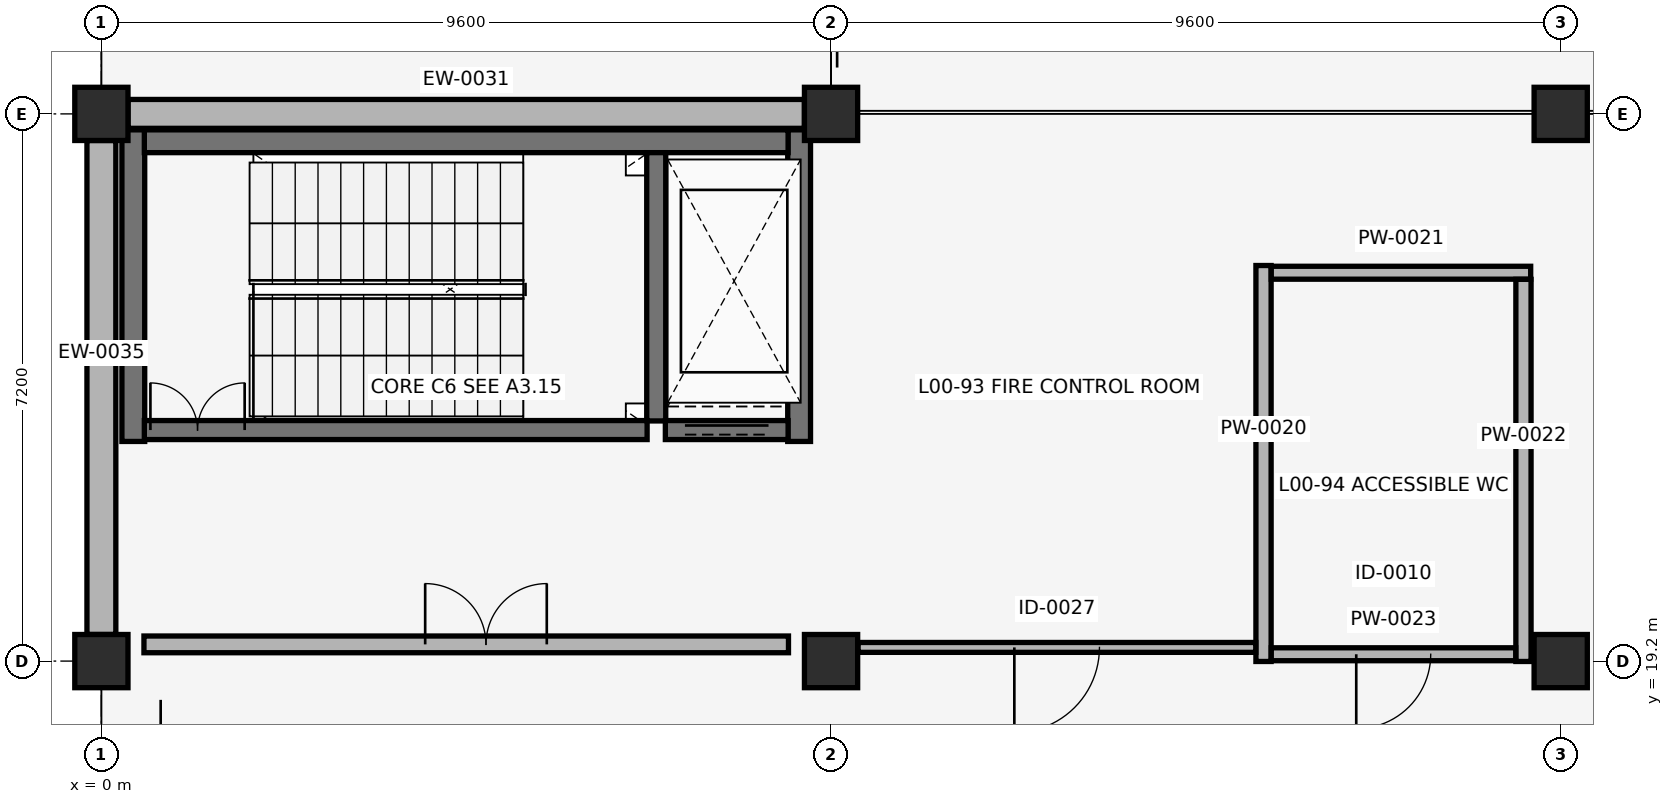
"""IFC4 building model, lengths in metres.
Left out: names, types, materials, properties, quantities, classifications, styles, units other than length and angle.
Written with IfcOpenShell. Run it as: python <this file> out.ifc"""

import sys

from ifc_helpers import new_model, si_unit, direction, frame, frame_2d, origin, origin_2d, place, context, subcontext, project, spatial, rectangle, circle, extrude, element, fill, save


model = new_model("IFC4")
c1 = context("Model", 3, precision=1e-05, world=origin(), true_north=direction((0.0, 1.0)))
c2 = subcontext(c1, "Body", "Model", "MODEL_VIEW")
j1 = project(units=[si_unit("LENGTHUNIT", "METRE"), si_unit("PLANEANGLEUNIT", "RADIAN")], contexts=[c1])
p1 = place(None, origin())
s1 = spatial("IfcSite", under=j1, at=p1, CompositionType="ELEMENT")
p2 = place(p1, origin())
s2 = spatial("IfcBuilding", under=s1, at=p2, CompositionType="ELEMENT")
p3 = place(p2, origin())
s3 = spatial("IfcBuildingStorey", under=s2, at=p3, CompositionType="ELEMENT", Elevation=0.0)
for number, where, z_axis, x_axis in (
    (1, (0.0, 19.2, 0.0), (0.0, 0.0, 1.0), (1.0, 0.0, 0.0)),
    (2, (0.0, 26.4, 0.0), (0.0, 0.0, 1.0), (1.0, 0.0, 0.0)),
    (3, (9.6, 19.2, 0.0), (0.0, 0.0, 1.0), (1.0, 0.0, 0.0)),
    (4, (9.6, 26.4, 0.0), (0.0, 0.0, 1.0), (1.0, 0.0, 0.0)),
    (5, (19.2, 19.2, 0.0), (0.0, 0.0, 1.0), (1.0, 0.0, 0.0)),
    (6, (19.2, 26.4, 0.0), (0.0, 0.0, 1.0), (1.0, 0.0, 0.0)),
):
    element("IfcColumn", number, at=place(p3, frame(where, z_axis=z_axis, x_axis=x_axis)), inside=s3, PredefinedType="COLUMN", context=c2, shape_type="SweptSolid", body=[
        extrude(circle(Radius=0.35, at=origin_2d()), origin(), (0.0, 0.0, 1.0), 4.42),
    ])
p4 = place(p3, frame((9.25, 26.4, 0.0), z_axis=(0.0, 0.0, 1.0), x_axis=(-1.0, 0.0, 0.0)))
e7 = element("IfcWall", 7, at=p4, inside=s3, PredefinedType="SOLIDWALL", context=c2, shape_type="SweptSolid", body=[
    extrude(rectangle(XDim=8.9, YDim=0.38, at=frame_2d((4.45, 0.0))), origin(), (0.0, 0.0, 1.0), 3.31),
])
p5 = place(p3, frame((0.0, 26.05, 0.0), z_axis=(0.0, 0.0, 1.0), x_axis=(0.0, -1.0, 0.0)))
e8 = element("IfcWall", 8, at=p5, inside=s3, PredefinedType="SOLIDWALL", context=c2, shape_type="SweptSolid", body=[
    extrude(rectangle(XDim=6.5, YDim=0.38, at=frame_2d((3.25, 0.0))), origin(), (0.0, 0.0, 1.0), 3.31),
])
for number, where, z_axis, x_axis in (
    (9, (0.42, 22.09, 0.0), (0.0, 0.0, 1.0), (0.0, 1.0, 0.0)),
    (10, (9.18, 22.09, 0.0), (0.0, 0.0, 1.0), (0.0, 1.0, 0.0)),
):
    element("IfcWall", number, at=place(p3, frame(where, z_axis=z_axis, x_axis=x_axis)), inside=s3, PredefinedType="SHEAR", context=c2, shape_type="SweptSolid", body=[
        extrude(rectangle(XDim=4.1, YDim=0.3, at=frame_2d((2.05, 0.0))), origin(), (0.0, 0.0, 1.0), 4.08),
    ])
p6 = place(p3, frame((0.565, 26.04, 0.0), z_axis=(0.0, 0.0, 1.0), x_axis=(1.0, 0.0, 0.0)))
e11 = element("IfcWall", 11, at=p6, inside=s3, PredefinedType="SHEAR", context=c2, shape_type="SweptSolid", body=[
    extrude(rectangle(XDim=8.47, YDim=0.3, at=frame_2d((4.235, 0.0))), origin(), (0.0, 0.0, 1.0), 4.08),
])
p7 = place(p3, frame((7.3, 22.36, 0.0), z_axis=(0.0, 0.0, 1.0), x_axis=(0.0, 1.0, 0.0)))
e12 = element("IfcWall", 12, at=p7, inside=s3, PredefinedType="SHEAR", context=c2, shape_type="SweptSolid", body=[
    extrude(rectangle(XDim=3.53, YDim=0.25, at=frame_2d((1.765, 0.0))), origin(), (0.0, 0.0, 1.0), 4.08),
])
p8 = place(p3, frame((0.565, 22.24, 0.0), z_axis=(0.0, 0.0, 1.0), x_axis=(1.0, 0.0, 0.0)))
e13 = element("IfcWall", 13, at=p8, inside=s3, PredefinedType="SHEAR", context=c2, shape_type="SweptSolid", body=[
    extrude(rectangle(XDim=6.615, YDim=0.25, at=frame_2d((3.308, 0.0))), origin(), (0.0, 0.0, 1.0), 4.08),
])
p9 = place(p8, frame((0.08, 0.0, 0.0)))
e14 = element("IfcOpeningElement", 14, at=p9, cuts=e13, PredefinedType="OPENING", context=c2, shape_type="SweptSolid", body=[
    extrude(rectangle(XDim=1.24, YDim=2.15, at=frame_2d((0.62, 1.075))), frame((0.0, 0.135, 0.0), z_axis=(0.0, -1.0, 0.0), x_axis=(1.0, 0.0, 0.0)), (0.0, 0.0, 1.0), 0.27),
])
p10 = place(p3, frame((0.56, 19.42, 0.0), z_axis=(0.0, 0.0, 1.0), x_axis=(1.0, 0.0, 0.0)))
e15 = element("IfcWall", 15, at=p10, inside=s3, PredefinedType="PARTITIONING", context=c2, shape_type="SweptSolid", body=[
    extrude(rectangle(XDim=8.48, YDim=0.22, at=frame_2d((4.24, 0.0))), origin(), (0.0, 0.0, 1.0), 3.21),
])
p11 = place(p10, frame((3.7, 0.0, 0.0)))
e16 = element("IfcOpeningElement", 16, at=p11, cuts=e15, PredefinedType="OPENING", context=c2, shape_type="SweptSolid", body=[
    extrude(rectangle(XDim=1.6, YDim=2.2, at=frame_2d((0.8, 1.1))), frame((0.0, 0.12, 0.0), z_axis=(0.0, -1.0, 0.0), x_axis=(1.0, 0.0, 0.0)), (0.0, 0.0, 1.0), 0.24),
])
p12 = place(p3, frame((7.42, 22.24, 0.0), z_axis=(0.0, 0.0, 1.0), x_axis=(1.0, 0.0, 0.0)))
e17 = element("IfcWall", 17, at=p12, inside=s3, PredefinedType="SHEAR", context=c2, shape_type="SweptSolid", body=[
    extrude(rectangle(XDim=1.615, YDim=0.25, at=frame_2d((0.808, 0.0))), origin(), (0.0, 0.0, 1.0), 4.08),
])
p13 = place(p12, frame((0.258, 0.0, 0.0)))
e18 = element("IfcOpeningElement", 18, at=p13, cuts=e17, PredefinedType="OPENING", context=c2, shape_type="SweptSolid", body=[
    extrude(rectangle(XDim=1.1, YDim=2.15, at=frame_2d((0.55, 1.075))), frame((0.0, 0.135, 0.0), z_axis=(0.0, -1.0, 0.0), x_axis=(1.0, 0.0, 0.0)), (0.0, 0.0, 1.0), 0.27),
])
p14 = place(p3, frame((15.29, 19.195, 0.0), z_axis=(0.0, 0.0, 1.0), x_axis=(0.0, 1.0, 0.0)))
e19 = element("IfcWall", 19, at=p14, inside=s3, PredefinedType="PLUMBINGWALL", context=c2, shape_type="SweptSolid", body=[
    extrude(rectangle(XDim=5.21, YDim=0.2, at=frame_2d((2.605, 0.0))), origin(), (0.0, 0.0, 1.0), 3.21),
])
p15 = place(p3, frame((15.392, 24.31, 0.0), z_axis=(0.0, 0.0, 1.0), x_axis=(1.0, 0.0, 0.0)))
e20 = element("IfcWall", 20, at=p15, inside=s3, PredefinedType="PLUMBINGWALL", context=c2, shape_type="SweptSolid", body=[
    extrude(rectangle(XDim=3.413, YDim=0.17, at=frame_2d((1.707, 0.0))), origin(), (0.0, 0.0, 1.0), 3.46),
])
p16 = place(p3, frame((18.71, 19.195, 0.0), z_axis=(0.0, 0.0, 1.0), x_axis=(0.0, 1.0, 0.0)))
e21 = element("IfcWall", 21, at=p16, inside=s3, PredefinedType="PLUMBINGWALL", context=c2, shape_type="SweptSolid", body=[
    extrude(rectangle(XDim=5.028, YDim=0.2, at=frame_2d((2.514, 0.0))), origin(), (0.0, 0.0, 1.0), 3.21),
])
p17 = place(p3, frame((15.392, 19.29, 0.0), z_axis=(0.0, 0.0, 1.0), x_axis=(1.0, 0.0, 0.0)))
e22 = element("IfcWall", 22, at=p17, inside=s3, PredefinedType="PLUMBINGWALL", context=c2, shape_type="SweptSolid", body=[
    extrude(rectangle(XDim=3.216, YDim=0.17, at=frame_2d((1.608, 0.0))), origin(), (0.0, 0.0, 1.0), 3.21),
])
p18 = place(p17, frame((1.118, 0.0, 0.0)))
e23 = element("IfcOpeningElement", 23, at=p18, cuts=e22, PredefinedType="OPENING", context=c2, shape_type="SweptSolid", body=[
    extrude(rectangle(XDim=0.98, YDim=2.08, at=frame_2d((0.49, 1.04))), frame((0.0, 0.095, 0.0), z_axis=(0.0, -1.0, 0.0), x_axis=(1.0, 0.0, 0.0)), (0.0, 0.0, 1.0), 0.19),
])
p19 = place(p3, frame((9.955, 19.38, 0.0), z_axis=(0.0, 0.0, 1.0), x_axis=(1.0, 0.0, 0.0)))
e24 = element("IfcWall", 24, at=p19, inside=s3, PredefinedType="PARTITIONING", context=c2, shape_type="SweptSolid", body=[
    extrude(rectangle(XDim=5.233, YDim=0.13, at=frame_2d((2.616, 0.0))), origin(), (0.0, 0.0, 1.0), 3.21),
])
p20 = place(p19, frame((2.056, 0.0, 0.0)))
e25 = element("IfcOpeningElement", 25, at=p20, cuts=e24, PredefinedType="OPENING", context=c2, shape_type="SweptSolid", body=[
    extrude(rectangle(XDim=1.12, YDim=2.1, at=frame_2d((0.56, 1.05))), frame((0.0, 0.075, 0.0), z_axis=(0.0, -1.0, 0.0), x_axis=(1.0, 0.0, 0.0)), (0.0, 0.0, 1.0), 0.15),
])
p21 = place(p9, origin())
e26 = element("IfcDoor", 26, at=p21, inside=s3, OperationType="DOUBLE_DOOR_SINGLE_SWING", PredefinedType="DOOR", context=c2, shape_type="SweptSolid", body=[
    extrude(rectangle(XDim=1.24, YDim=2.15, at=frame_2d((0.62, 1.075))), frame((0.0, 0.025, 0.0), z_axis=(0.0, -1.0, 0.0), x_axis=(1.0, 0.0, 0.0)), (0.0, 0.0, 1.0), 0.05),
])
fill(e14, e26)
p22 = place(p11, origin())
e27 = element("IfcDoor", 27, at=p22, inside=s3, OperationType="DOUBLE_DOOR_SINGLE_SWING", PredefinedType="DOOR", context=c2, shape_type="SweptSolid", body=[
    extrude(rectangle(XDim=1.6, YDim=2.2, at=frame_2d((0.8, 1.1))), frame((0.0, 0.025, 0.0), z_axis=(0.0, -1.0, 0.0), x_axis=(1.0, 0.0, 0.0)), (0.0, 0.0, 1.0), 0.05),
])
fill(e16, e27)
p23 = place(p13, origin())
e28 = element("IfcDoor", 28, at=p23, inside=s3, OperationType="DOUBLE_DOOR_SLIDING", PredefinedType="DOOR", context=c2, shape_type="SweptSolid", body=[
    extrude(rectangle(XDim=1.1, YDim=2.15, at=frame_2d((0.55, 1.075))), frame((0.0, 0.025, 0.0), z_axis=(0.0, -1.0, 0.0), x_axis=(1.0, 0.0, 0.0)), (0.0, 0.0, 1.0), 0.05),
])
fill(e18, e28)
p24 = place(p18, origin())
e29 = element("IfcDoor", 29, at=p24, inside=s3, OperationType="SINGLE_SWING_RIGHT", PredefinedType="DOOR", context=c2, shape_type="SweptSolid", body=[
    extrude(rectangle(XDim=0.98, YDim=2.08, at=frame_2d((0.49, 1.04))), frame((0.0, 0.025, 0.0), z_axis=(0.0, -1.0, 0.0), x_axis=(1.0, 0.0, 0.0)), (0.0, 0.0, 1.0), 0.05),
])
fill(e23, e29)
p25 = place(p20, origin())
e30 = element("IfcDoor", 30, at=p25, inside=s3, OperationType="SINGLE_SWING_RIGHT", PredefinedType="DOOR", context=c2, shape_type="SweptSolid", body=[
    extrude(rectangle(XDim=1.12, YDim=2.1, at=frame_2d((0.56, 1.05))), frame((0.0, 0.025, 0.0), z_axis=(0.0, -1.0, 0.0), x_axis=(1.0, 0.0, 0.0)), (0.0, 0.0, 1.0), 0.05),
])
fill(e25, e30)
save(model, sys.argv[1])
